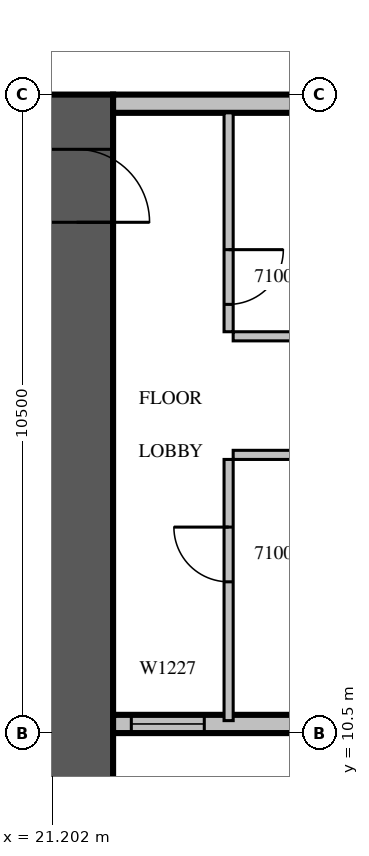
"""IFC4 building model, lengths in metres.
Left out: names, types, materials, properties, quantities, classifications, styles, units other than length and angle.
Written with IfcOpenShell. Run it as: python <this file> out.ifc"""

import sys

from ifc_helpers import new_model, si_unit, direction, frame, frame_2d, origin, place, context, subcontext, project, spatial, rectangle, extrude, source, transform, mapped, element, fill, save


model = new_model("IFC4")
c1 = context("Model", 3, precision=1e-05, world=origin(), true_north=direction((0.0, 1.0)))
c2 = subcontext(c1, "Body", "Model", "MODEL_VIEW")
j1 = project(units=[si_unit("LENGTHUNIT", "METRE"), si_unit("PLANEANGLEUNIT", "RADIAN")], contexts=[c1])
p1 = place(None, origin())
s1 = spatial("IfcSite", under=j1, at=p1, CompositionType="ELEMENT")
p2 = place(p1, origin())
s2 = spatial("IfcBuilding", under=s1, at=p2, CompositionType="ELEMENT")
p3 = place(p2, frame((0.0, 0.0, 53.1)))
s3 = spatial("IfcBuildingStorey", under=s2, at=p3, CompositionType="ELEMENT", Elevation=53.1)
m1 = source(origin(), c2, "Body", "SweptSolid", [
    extrude(rectangle(XDim=16.8, YDim=1.2, at=frame_2d((8.4, 0.0))), origin(), (0.0, 0.0, 1.0), 4.2),
])
p4 = place(p3, frame((21.6, 4.2, 0.0), z_axis=(0.0, 0.0, 1.0), x_axis=(0.0, 1.0, 0.0)))
e1 = element("IfcWall", 1, at=p4, inside=s3, PredefinedType="SHEAR", context=c2, shape_type="MappedRepresentation", body=[
    mapped(m1, transform((0.0, 0.0, 0.0), scale=1.0)),
])
m2 = source(origin(), c2, "Body", "SweptSolid", [
    extrude(rectangle(XDim=1.2, YDim=2.1, at=frame_2d((0.6, 1.05))), frame((0.0, 0.61, 0.0), z_axis=(0.0, -1.0, 0.0), x_axis=(1.0, 0.0, 0.0)), (0.0, 0.0, 1.0), 1.22),
])
p5 = place(p4, frame((14.7, 0.0, 0.0)))
e2 = element("IfcOpeningElement", 2, at=p5, cuts=e1, PredefinedType="OPENING", context=c2, shape_type="MappedRepresentation", body=[
    mapped(m2, transform((0.0, 0.0, 0.0), scale=1.0)),
])
m3 = source(origin(), c2, "Body", "SweptSolid", [
    extrude(rectangle(XDim=6.6, YDim=0.3, at=frame_2d((3.3, 0.0))), origin(), (0.0, 0.0, 1.0), 3.8),
])
p6 = place(p3, frame((22.2, 10.65, 0.0), z_axis=(0.0, 0.0, 1.0), x_axis=(1.0, 0.0, 0.0)))
e3 = element("IfcWall", 3, at=p6, inside=s3, PredefinedType="STANDARD", context=c2, shape_type="MappedRepresentation", body=[
    mapped(m3, transform((0.0, 0.0, 0.0), scale=1.0)),
])
m4 = source(origin(), c2, "Body", "SweptSolid", [
    extrude(rectangle(XDim=1.2, YDim=2.7, at=frame_2d((0.6, 1.35))), frame((0.0, 0.16, 0.0), z_axis=(0.0, -1.0, 0.0), x_axis=(1.0, 0.0, 0.0)), (0.0, 0.0, 1.0), 0.32),
])
p7 = place(p6, frame((0.3, 0.0, 0.6)))
e4 = element("IfcOpeningElement", 4, at=p7, cuts=e3, PredefinedType="OPENING", context=c2, shape_type="MappedRepresentation", body=[
    mapped(m4, transform((0.0, 0.0, 0.0), scale=1.0)),
])
m5 = source(origin(), c2, "Body", "SweptSolid", [
    extrude(rectangle(XDim=2.4, YDim=2.7, at=frame_2d((1.2, 1.35))), frame((0.0, 0.16, 0.0), z_axis=(0.0, -1.0, 0.0), x_axis=(1.0, 0.0, 0.0)), (0.0, 0.0, 1.0), 0.32),
])
p8 = place(p6, frame((3.9, 0.0, 0.6)))
e5 = element("IfcOpeningElement", 5, at=p8, cuts=e3, PredefinedType="OPENING", context=c2, shape_type="MappedRepresentation", body=[
    mapped(m5, transform((0.0, 0.0, 0.0), scale=1.0)),
])
p9 = place(p3, frame((28.8, 20.85, 0.0), z_axis=(0.0, 0.0, 1.0), x_axis=(-1.0, 0.0, 0.0)))
e6 = element("IfcWall", 6, at=p9, inside=s3, PredefinedType="STANDARD", context=c2, shape_type="MappedRepresentation", body=[
    mapped(m3, transform((0.0, 0.0, 0.0), scale=1.0)),
])
p10 = place(p9, frame((0.3, 0.0, 0.6)))
e7 = element("IfcOpeningElement", 7, at=p10, cuts=e6, PredefinedType="OPENING", context=c2, shape_type="MappedRepresentation", body=[
    mapped(m5, transform((0.0, 0.0, 0.0), scale=1.0)),
])
m6 = source(origin(), c2, "Body", "SweptSolid", [
    extrude(rectangle(XDim=4.295, YDim=0.15, at=frame_2d((2.147, 0.0))), origin(), (0.0, 0.0, 1.0), 3.8),
])
p11 = place(p3, frame((24.1, 15.0, 0.0), z_axis=(0.0, 0.0, 1.0), x_axis=(0.0, -1.0, 0.0)))
e8 = element("IfcWall", 8, at=p11, inside=s3, PredefinedType="PARTITIONING", context=c2, shape_type="MappedRepresentation", body=[
    mapped(m6, transform((0.0, 0.0, 0.0), scale=1.0)),
])
m7 = source(origin(), c2, "Body", "SweptSolid", [
    extrude(rectangle(XDim=0.9, YDim=2.1, at=frame_2d((0.45, 1.05))), frame((0.0, 0.085, 0.0), z_axis=(0.0, -1.0, 0.0), x_axis=(1.0, 0.0, 0.0)), (0.0, 0.0, 1.0), 0.17),
])
p12 = place(p11, frame((1.113, 0.0, 0.0)))
e9 = element("IfcOpeningElement", 9, at=p12, cuts=e8, PredefinedType="OPENING", context=c2, shape_type="MappedRepresentation", body=[
    mapped(m7, transform((0.0, 0.0, 0.0), scale=1.0)),
])
m8 = source(origin(), c2, "Body", "SweptSolid", [
    extrude(rectangle(XDim=3.6, YDim=0.15, at=frame_2d((1.8, 0.0))), origin(), (0.0, 0.0, 1.0), 3.8),
])
p13 = place(p3, frame((24.1, 20.7, 0.0), z_axis=(0.0, 0.0, 1.0), x_axis=(0.0, -1.0, 0.0)))
e10 = element("IfcWall", 10, at=p13, inside=s3, PredefinedType="PARTITIONING", context=c2, shape_type="MappedRepresentation", body=[
    mapped(m8, transform((0.0, 0.0, 0.0), scale=1.0)),
])
p14 = place(p13, frame((2.25, 0.0, 0.0)))
e11 = element("IfcOpeningElement", 11, at=p14, cuts=e10, PredefinedType="OPENING", context=c2, shape_type="MappedRepresentation", body=[
    mapped(m7, transform((0.0, 0.0, 0.0), scale=1.0)),
])
m9 = source(origin(), c2, "Body", "SweptSolid", [
    extrude(rectangle(XDim=5.15, YDim=0.15, at=frame_2d((2.575, 0.0))), origin(), (0.0, 0.0, 1.0), 3.8),
])
for number, where, z_axis, x_axis in (
    (12, (29.325, 15.075, 0.0), (0.0, 0.0, 1.0), (-1.0, 0.0, 0.0)),
    (13, (24.175, 17.025, 0.0), (0.0, 0.0, 1.0), (1.0, 0.0, 0.0)),
):
    element("IfcWall", number, at=place(p3, frame(where, z_axis=z_axis, x_axis=x_axis)), inside=s3, PredefinedType="PARTITIONING", context=c2, shape_type="MappedRepresentation", body=[
        mapped(m9, transform((0.0, 0.0, 0.0), scale=1.0)),
    ])
m10 = source(origin(), c2, "Body", "SweptSolid", [
    extrude(rectangle(XDim=1.2, YDim=2.7, at=frame_2d((0.6, 1.35))), frame((0.0, 0.03, 0.0), z_axis=(0.0, -1.0, 0.0), x_axis=(1.0, 0.0, 0.0)), (0.0, 0.0, 1.0), 0.06),
])
p15 = place(p7, origin())
e14 = element("IfcWindow", 14, at=p15, inside=s3, PartitioningType="SINGLE_PANEL", PredefinedType="WINDOW", context=c2, shape_type="MappedRepresentation", body=[
    mapped(m10, transform((0.0, 0.0, 0.0), scale=1.0)),
])
fill(e4, e14)
m11 = source(origin(), c2, "Body", "SweptSolid", [
    extrude(rectangle(XDim=1.2, YDim=2.1, at=frame_2d((0.6, 1.05))), frame((0.0, 0.025, 0.0), z_axis=(0.0, -1.0, 0.0), x_axis=(1.0, 0.0, 0.0)), (0.0, 0.0, 1.0), 0.05),
])
p16 = place(p5, origin())
e15 = element("IfcDoor", 15, at=p16, inside=s3, OperationType="SINGLE_SWING_RIGHT", PredefinedType="DOOR", context=c2, shape_type="MappedRepresentation", body=[
    mapped(m11, transform((0.0, 0.0, 0.0), scale=1.0)),
])
fill(e2, e15)
m12 = source(origin(), c2, "Body", "SweptSolid", [
    extrude(rectangle(XDim=0.9, YDim=2.1, at=frame_2d((0.45, 1.05))), frame((0.0, 0.025, 0.0), z_axis=(0.0, -1.0, 0.0), x_axis=(1.0, 0.0, 0.0)), (0.0, 0.0, 1.0), 0.05),
])
p17 = place(p12, origin())
e16 = element("IfcDoor", 16, at=p17, inside=s3, OperationType="SINGLE_SWING_RIGHT", PredefinedType="DOOR", context=c2, shape_type="MappedRepresentation", body=[
    mapped(m12, transform((0.0, 0.0, 0.0), scale=1.0)),
])
fill(e9, e16)
p18 = place(p14, origin())
e17 = element("IfcDoor", 17, at=p18, inside=s3, OperationType="SINGLE_SWING_LEFT", PredefinedType="DOOR", context=c2, shape_type="MappedRepresentation", body=[
    mapped(m12, transform((0.0, 0.0, 0.0), scale=1.0)),
])
fill(e11, e17)
save(model, sys.argv[1])
